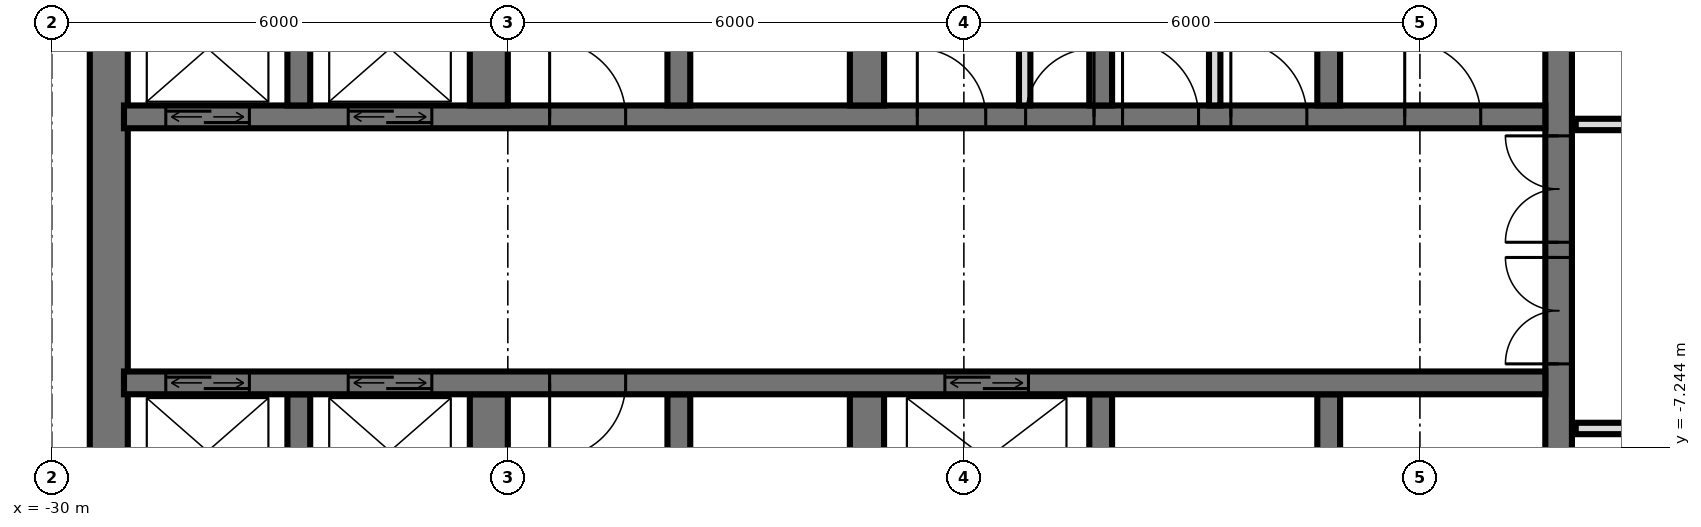
"""IFC4 building model, lengths in metres.
Left out: names, types, materials, properties, quantities, classifications, styles, units other than length and angle.
Written with IfcOpenShell. Run it as: python <this file> out.ifc"""

import sys

from ifc_helpers import new_model, si_unit, direction, frame, frame_2d, origin, place, context, subcontext, project, spatial, rectangle, extrude, element, fill, save


model = new_model("IFC4")
c1 = context("Model", 3, precision=1e-05, world=origin(), true_north=direction((0.0, 1.0)))
c2 = subcontext(c1, "Body", "Model", "MODEL_VIEW")
j1 = project(units=[si_unit("LENGTHUNIT", "METRE"), si_unit("PLANEANGLEUNIT", "RADIAN")], contexts=[c1])
p1 = place(None, origin())
s1 = spatial("IfcSite", under=j1, at=p1, CompositionType="ELEMENT")
p2 = place(p1, origin())
s2 = spatial("IfcBuilding", under=s1, at=p2, CompositionType="ELEMENT")
p3 = place(p2, frame((0.0, 0.0, 78.0)))
s3 = spatial("IfcBuildingStorey", under=s2, at=p3, CompositionType="ELEMENT", Elevation=78.0)
p4 = place(p3, frame((-10.175, -14.55, 0.0), z_axis=(0.0, 0.0, 1.0), x_axis=(0.0, 1.0, 0.0)))
e1 = element("IfcWall", 1, at=p4, inside=s3, PredefinedType="SHEAR", context=c2, shape_type="SweptSolid", body=[
    extrude(rectangle(XDim=14.1, YDim=0.35, at=frame_2d((7.05, 0.0))), origin(), (0.0, 0.0, 1.0), 3.6),
])
p5 = place(p4, frame((8.4, 0.0, 0.0)))
e2 = element("IfcOpeningElement", 2, at=p5, cuts=e1, PredefinedType="OPENING", context=c2, shape_type="SweptSolid", body=[
    extrude(rectangle(XDim=1.4, YDim=2.4, at=frame_2d((0.7, 1.2))), frame((0.0, 0.185, 0.0), z_axis=(0.0, -1.0, 0.0), x_axis=(1.0, 0.0, 0.0)), (0.0, 0.0, 1.0), 0.37),
])
p6 = place(p4, frame((10.0, 0.0, 0.0)))
e3 = element("IfcOpeningElement", 3, at=p6, cuts=e1, PredefinedType="OPENING", context=c2, shape_type="SweptSolid", body=[
    extrude(rectangle(XDim=1.4, YDim=2.4, at=frame_2d((0.7, 1.2))), frame((0.0, 0.185, 0.0), z_axis=(0.0, -1.0, 0.0), x_axis=(1.0, 0.0, 0.0)), (0.0, 0.0, 1.0), 0.37),
])
p7 = place(p4, frame((4.0, 0.0, 0.0)))
e4 = element("IfcOpeningElement", 4, at=p7, cuts=e1, PredefinedType="OPENING", context=c2, shape_type="SweptSolid", body=[
    extrude(rectangle(XDim=1.2, YDim=2.1, at=frame_2d((0.6, 1.05))), frame((0.0, 0.185, 0.0), z_axis=(0.0, -1.0, 0.0), x_axis=(1.0, 0.0, 0.0)), (0.0, 0.0, 1.0), 0.37),
])
p8 = place(p3, frame((-29.25, -14.55, 0.0), z_axis=(0.0, 0.0, 1.0), x_axis=(0.0, 1.0, 0.0)))
e5 = element("IfcWall", 5, at=p8, inside=s3, PredefinedType="SHEAR", context=c2, shape_type="SweptSolid", body=[
    extrude(rectangle(XDim=14.1, YDim=0.5, at=frame_2d((7.05, 0.0))), origin(), (0.0, 0.0, 1.0), 3.6),
])
p9 = place(p3, frame((-29.05, -2.9, 0.0), z_axis=(0.0, 0.0, 1.0), x_axis=(1.0, 0.0, 0.0)))
e6 = element("IfcWall", 6, at=p9, inside=s3, PredefinedType="SHEAR", context=c2, shape_type="SweptSolid", body=[
    extrude(rectangle(XDim=18.7, YDim=0.3, at=frame_2d((9.35, 0.0))), origin(), (0.0, 0.0, 1.0), 3.6),
])
p10 = place(p9, frame((2.95, 0.0, 0.0)))
e7 = element("IfcOpeningElement", 7, at=p10, cuts=e6, PredefinedType="OPENING", context=c2, shape_type="SweptSolid", body=[
    extrude(rectangle(XDim=1.1, YDim=2.1, at=frame_2d((0.55, 1.05))), frame((0.0, 0.16, 0.0), z_axis=(0.0, -1.0, 0.0), x_axis=(1.0, 0.0, 0.0)), (0.0, 0.0, 1.0), 0.32),
])
p11 = place(p9, frame((0.55, 0.0, 0.0)))
e8 = element("IfcOpeningElement", 8, at=p11, cuts=e6, PredefinedType="OPENING", context=c2, shape_type="SweptSolid", body=[
    extrude(rectangle(XDim=1.1, YDim=2.1, at=frame_2d((0.55, 1.05))), frame((0.0, 0.16, 0.0), z_axis=(0.0, -1.0, 0.0), x_axis=(1.0, 0.0, 0.0)), (0.0, 0.0, 1.0), 0.32),
])
p12 = place(p9, frame((11.863, 0.0, 0.0)))
e9 = element("IfcOpeningElement", 9, at=p12, cuts=e6, PredefinedType="OPENING", context=c2, shape_type="SweptSolid", body=[
    extrude(rectangle(XDim=0.9, YDim=2.1, at=frame_2d((0.45, 1.05))), frame((0.0, 0.16, 0.0), z_axis=(0.0, -1.0, 0.0), x_axis=(1.0, 0.0, 0.0)), (0.0, 0.0, 1.0), 0.32),
])
p13 = place(p9, frame((10.438, 0.0, 0.0)))
e10 = element("IfcOpeningElement", 10, at=p13, cuts=e6, PredefinedType="OPENING", context=c2, shape_type="SweptSolid", body=[
    extrude(rectangle(XDim=0.9, YDim=2.1, at=frame_2d((0.45, 1.05))), frame((0.0, 0.16, 0.0), z_axis=(0.0, -1.0, 0.0), x_axis=(1.0, 0.0, 0.0)), (0.0, 0.0, 1.0), 0.32),
])
p14 = place(p9, frame((16.85, 0.0, 0.0)))
e11 = element("IfcOpeningElement", 11, at=p14, cuts=e6, PredefinedType="OPENING", context=c2, shape_type="SweptSolid", body=[
    extrude(rectangle(XDim=1.0, YDim=2.1, at=frame_2d((0.5, 1.05))), frame((0.0, 0.16, 0.0), z_axis=(0.0, -1.0, 0.0), x_axis=(1.0, 0.0, 0.0)), (0.0, 0.0, 1.0), 0.32),
])
p15 = place(p9, frame((14.562, 0.0, 0.0)))
e12 = element("IfcOpeningElement", 12, at=p15, cuts=e6, PredefinedType="OPENING", context=c2, shape_type="SweptSolid", body=[
    extrude(rectangle(XDim=1.0, YDim=2.1, at=frame_2d((0.5, 1.05))), frame((0.0, 0.16, 0.0), z_axis=(0.0, -1.0, 0.0), x_axis=(1.0, 0.0, 0.0)), (0.0, 0.0, 1.0), 0.32),
])
p16 = place(p9, frame((13.137, 0.0, 0.0)))
e13 = element("IfcOpeningElement", 13, at=p16, cuts=e6, PredefinedType="OPENING", context=c2, shape_type="SweptSolid", body=[
    extrude(rectangle(XDim=1.0, YDim=2.1, at=frame_2d((0.5, 1.05))), frame((0.0, 0.16, 0.0), z_axis=(0.0, -1.0, 0.0), x_axis=(1.0, 0.0, 0.0)), (0.0, 0.0, 1.0), 0.32),
])
p17 = place(p9, frame((5.6, 0.0, 0.0)))
e14 = element("IfcOpeningElement", 14, at=p17, cuts=e6, PredefinedType="OPENING", context=c2, shape_type="SweptSolid", body=[
    extrude(rectangle(XDim=1.0, YDim=2.1, at=frame_2d((0.5, 1.05))), frame((0.0, 0.16, 0.0), z_axis=(0.0, -1.0, 0.0), x_axis=(1.0, 0.0, 0.0)), (0.0, 0.0, 1.0), 0.32),
])
p18 = place(p3, frame((-29.05, -6.4, 0.0), z_axis=(0.0, 0.0, 1.0), x_axis=(1.0, 0.0, 0.0)))
e15 = element("IfcWall", 15, at=p18, inside=s3, PredefinedType="SHEAR", context=c2, shape_type="SweptSolid", body=[
    extrude(rectangle(XDim=18.7, YDim=0.3, at=frame_2d((9.35, 0.0))), origin(), (0.0, 0.0, 1.0), 3.6),
])
p19 = place(p18, frame((2.95, 0.0, 0.0)))
e16 = element("IfcOpeningElement", 16, at=p19, cuts=e15, PredefinedType="OPENING", context=c2, shape_type="SweptSolid", body=[
    extrude(rectangle(XDim=1.1, YDim=2.1, at=frame_2d((0.55, 1.05))), frame((0.0, 0.16, 0.0), z_axis=(0.0, -1.0, 0.0), x_axis=(1.0, 0.0, 0.0)), (0.0, 0.0, 1.0), 0.32),
])
p20 = place(p18, frame((0.55, 0.0, 0.0)))
e17 = element("IfcOpeningElement", 17, at=p20, cuts=e15, PredefinedType="OPENING", context=c2, shape_type="SweptSolid", body=[
    extrude(rectangle(XDim=1.1, YDim=2.1, at=frame_2d((0.55, 1.05))), frame((0.0, 0.16, 0.0), z_axis=(0.0, -1.0, 0.0), x_axis=(1.0, 0.0, 0.0)), (0.0, 0.0, 1.0), 0.32),
])
p21 = place(p18, frame((10.8, 0.0, 0.0)))
e18 = element("IfcOpeningElement", 18, at=p21, cuts=e15, PredefinedType="OPENING", context=c2, shape_type="SweptSolid", body=[
    extrude(rectangle(XDim=1.1, YDim=2.1, at=frame_2d((0.55, 1.05))), frame((0.0, 0.16, 0.0), z_axis=(0.0, -1.0, 0.0), x_axis=(1.0, 0.0, 0.0)), (0.0, 0.0, 1.0), 0.32),
])
p22 = place(p18, frame((5.6, 0.0, 0.0)))
e19 = element("IfcOpeningElement", 19, at=p22, cuts=e15, PredefinedType="OPENING", context=c2, shape_type="SweptSolid", body=[
    extrude(rectangle(XDim=1.0, YDim=2.1, at=frame_2d((0.5, 1.05))), frame((0.0, 0.16, 0.0), z_axis=(0.0, -1.0, 0.0), x_axis=(1.0, 0.0, 0.0)), (0.0, 0.0, 1.0), 0.32),
])
for number, where, z_axis, x_axis in (
    (20, (-13.2, -2.75, 0.0), (0.0, 0.0, 1.0), (0.0, 1.0, 0.0)),
    (21, (-13.2, -8.85, 0.0), (0.0, 0.0, 1.0), (0.0, 1.0, 0.0)),
    (22, (-16.2, -2.75, 0.0), (0.0, 0.0, 1.0), (0.0, 1.0, 0.0)),
    (23, (-16.2, -8.85, 0.0), (0.0, 0.0, 1.0), (0.0, 1.0, 0.0)),
):
    element("IfcWall", number, at=place(p3, frame(where, z_axis=z_axis, x_axis=x_axis)), inside=s3, PredefinedType="SHEAR", context=c2, shape_type="SweptSolid", body=[
        extrude(rectangle(XDim=2.3, YDim=0.3, at=frame_2d((1.15, 0.0))), origin(), (0.0, 0.0, 1.0), 3.6),
    ])
for number, where, z_axis, x_axis in (
    (24, (-19.275, -2.75, 0.0), (0.0, 0.0, 1.0), (0.0, 1.0, 0.0)),
    (25, (-19.275, -8.85, 0.0), (0.0, 0.0, 1.0), (0.0, 1.0, 0.0)),
):
    element("IfcWall", number, at=place(p3, frame(where, z_axis=z_axis, x_axis=x_axis)), inside=s3, PredefinedType="SHEAR", context=c2, shape_type="SweptSolid", body=[
        extrude(rectangle(XDim=2.3, YDim=0.45, at=frame_2d((1.15, 0.0))), origin(), (0.0, 0.0, 1.0), 3.6),
    ])
for number, where, z_axis, x_axis in (
    (26, (-21.75, -2.75, 0.0), (0.0, 0.0, 1.0), (0.0, 1.0, 0.0)),
    (27, (-21.75, -8.85, 0.0), (0.0, 0.0, 1.0), (0.0, 1.0, 0.0)),
):
    element("IfcWall", number, at=place(p3, frame(where, z_axis=z_axis, x_axis=x_axis)), inside=s3, PredefinedType="SHEAR", context=c2, shape_type="SweptSolid", body=[
        extrude(rectangle(XDim=2.3, YDim=0.3, at=frame_2d((1.15, 0.0))), origin(), (0.0, 0.0, 1.0), 3.6),
    ])
for number, where, z_axis, x_axis in (
    (28, (-24.25, -2.75, 0.0), (0.0, 0.0, 1.0), (0.0, 1.0, 0.0)),
    (29, (-24.25, -8.85, 0.0), (0.0, 0.0, 1.0), (0.0, 1.0, 0.0)),
):
    element("IfcWall", number, at=place(p3, frame(where, z_axis=z_axis, x_axis=x_axis)), inside=s3, PredefinedType="SHEAR", context=c2, shape_type="SweptSolid", body=[
        extrude(rectangle(XDim=2.3, YDim=0.5, at=frame_2d((1.15, 0.0))), origin(), (0.0, 0.0, 1.0), 3.6),
    ])
for number, where, z_axis, x_axis in (
    (30, (-26.75, -2.75, 0.0), (0.0, 0.0, 1.0), (0.0, 1.0, 0.0)),
    (31, (-26.75, -8.85, 0.0), (0.0, 0.0, 1.0), (0.0, 1.0, 0.0)),
):
    element("IfcWall", number, at=place(p3, frame(where, z_axis=z_axis, x_axis=x_axis)), inside=s3, PredefinedType="SHEAR", context=c2, shape_type="SweptSolid", body=[
        extrude(rectangle(XDim=2.3, YDim=0.3, at=frame_2d((1.15, 0.0))), origin(), (0.0, 0.0, 1.0), 3.6),
    ])
for number, where, z_axis, x_axis in (
    (32, (-17.2, -2.75, 0.0), (0.0, 0.0, 1.0), (0.0, 1.0, 0.0)),
    (33, (-14.7, -2.75, 0.0), (0.0, 0.0, 1.0), (0.0, 1.0, 0.0)),
):
    element("IfcWall", number, at=place(p3, frame(where, z_axis=z_axis, x_axis=x_axis)), inside=s3, PredefinedType="PARTITIONING", context=c2, shape_type="SweptSolid", body=[
        extrude(rectangle(XDim=2.3, YDim=0.15, at=frame_2d((1.15, 0.0))), origin(), (0.0, 0.0, 1.0), 3.3),
    ])
p23 = place(p3, frame((-9.95, -7.0, 0.0), z_axis=(0.0, 0.0, 1.0), x_axis=(1.0, 0.0, 0.0)))
e34 = element("IfcWall", 34, at=p23, inside=s3, PredefinedType="PARTITIONING", context=c2, shape_type="SweptSolid", body=[
    extrude(rectangle(XDim=19.9, YDim=0.15, at=frame_2d((9.95, 0.0))), origin(), (0.0, 0.0, 1.0), 3.32),
])
p24 = place(p23, frame((9.45, 0.0, 0.0)))
e35 = element("IfcOpeningElement", 35, at=p24, cuts=e34, PredefinedType="OPENING", context=c2, shape_type="SweptSolid", body=[
    extrude(rectangle(XDim=1.0, YDim=2.1, at=frame_2d((0.5, 1.05))), frame((0.0, 0.085, 0.0), z_axis=(0.0, -1.0, 0.0), x_axis=(1.0, 0.0, 0.0)), (0.0, 0.0, 1.0), 0.17),
])
p25 = place(p23, frame((15.45, 0.0, 0.0)))
e36 = element("IfcOpeningElement", 36, at=p25, cuts=e34, PredefinedType="OPENING", context=c2, shape_type="SweptSolid", body=[
    extrude(rectangle(XDim=1.0, YDim=2.1, at=frame_2d((0.5, 1.05))), frame((0.0, 0.085, 0.0), z_axis=(0.0, -1.0, 0.0), x_axis=(1.0, 0.0, 0.0)), (0.0, 0.0, 1.0), 0.17),
])
p26 = place(p3, frame((-9.95, -3.0, 0.0), z_axis=(0.0, 0.0, 1.0), x_axis=(1.0, 0.0, 0.0)))
e37 = element("IfcWall", 37, at=p26, inside=s3, PredefinedType="PARTITIONING", context=c2, shape_type="SweptSolid", body=[
    extrude(rectangle(XDim=19.9, YDim=0.15, at=frame_2d((9.95, 0.0))), origin(), (0.0, 0.0, 1.0), 3.32),
])
p27 = place(p26, frame((2.2, 0.0, 0.0)))
e38 = element("IfcOpeningElement", 38, at=p27, cuts=e37, PredefinedType="OPENING", context=c2, shape_type="SweptSolid", body=[
    extrude(rectangle(XDim=1.0, YDim=2.1, at=frame_2d((0.5, 1.05))), frame((0.0, 0.085, 0.0), z_axis=(0.0, -1.0, 0.0), x_axis=(1.0, 0.0, 0.0)), (0.0, 0.0, 1.0), 0.17),
])
p28 = place(p26, frame((7.2, 0.0, 0.0)))
e39 = element("IfcOpeningElement", 39, at=p28, cuts=e37, PredefinedType="OPENING", context=c2, shape_type="SweptSolid", body=[
    extrude(rectangle(XDim=1.0, YDim=2.1, at=frame_2d((0.5, 1.05))), frame((0.0, 0.085, 0.0), z_axis=(0.0, -1.0, 0.0), x_axis=(1.0, 0.0, 0.0)), (0.0, 0.0, 1.0), 0.17),
])
p29 = place(p26, frame((11.7, 0.0, 0.0)))
e40 = element("IfcOpeningElement", 40, at=p29, cuts=e37, PredefinedType="OPENING", context=c2, shape_type="SweptSolid", body=[
    extrude(rectangle(XDim=1.0, YDim=2.1, at=frame_2d((0.5, 1.05))), frame((0.0, 0.085, 0.0), z_axis=(0.0, -1.0, 0.0), x_axis=(1.0, 0.0, 0.0)), (0.0, 0.0, 1.0), 0.17),
])
p30 = place(p26, frame((15.45, 0.0, 0.0)))
e41 = element("IfcOpeningElement", 41, at=p30, cuts=e37, PredefinedType="OPENING", context=c2, shape_type="SweptSolid", body=[
    extrude(rectangle(XDim=1.0, YDim=2.1, at=frame_2d((0.5, 1.05))), frame((0.0, 0.085, 0.0), z_axis=(0.0, -1.0, 0.0), x_axis=(1.0, 0.0, 0.0)), (0.0, 0.0, 1.0), 0.17),
])
p31 = place(p26, frame((18.2, 0.0, 0.0)))
e42 = element("IfcOpeningElement", 42, at=p31, cuts=e37, PredefinedType="OPENING", context=c2, shape_type="SweptSolid", body=[
    extrude(rectangle(XDim=1.0, YDim=2.1, at=frame_2d((0.5, 1.05))), frame((0.0, 0.085, 0.0), z_axis=(0.0, -1.0, 0.0), x_axis=(1.0, 0.0, 0.0)), (0.0, 0.0, 1.0), 0.17),
])
p32 = place(p10, origin())
e43 = element("IfcDoor", 43, at=p32, inside=s3, OperationType="DOUBLE_DOOR_SLIDING", PredefinedType="USERDEFINED", context=c2, shape_type="SweptSolid", body=[
    extrude(rectangle(XDim=1.1, YDim=2.1, at=frame_2d((0.55, 1.05))), frame((0.0, 0.025, 0.0), z_axis=(0.0, -1.0, 0.0), x_axis=(1.0, 0.0, 0.0)), (0.0, 0.0, 1.0), 0.05),
])
fill(e7, e43)
p33 = place(p11, origin())
e44 = element("IfcDoor", 44, at=p33, inside=s3, OperationType="DOUBLE_DOOR_SLIDING", PredefinedType="USERDEFINED", context=c2, shape_type="SweptSolid", body=[
    extrude(rectangle(XDim=1.1, YDim=2.1, at=frame_2d((0.55, 1.05))), frame((0.0, 0.025, 0.0), z_axis=(0.0, -1.0, 0.0), x_axis=(1.0, 0.0, 0.0)), (0.0, 0.0, 1.0), 0.05),
])
fill(e8, e44)
p34 = place(p19, origin())
e45 = element("IfcDoor", 45, at=p34, inside=s3, OperationType="DOUBLE_DOOR_SLIDING", PredefinedType="USERDEFINED", context=c2, shape_type="SweptSolid", body=[
    extrude(rectangle(XDim=1.1, YDim=2.1, at=frame_2d((0.55, 1.05))), frame((0.0, 0.025, 0.0), z_axis=(0.0, -1.0, 0.0), x_axis=(1.0, 0.0, 0.0)), (0.0, 0.0, 1.0), 0.05),
])
fill(e16, e45)
p35 = place(p20, origin())
e46 = element("IfcDoor", 46, at=p35, inside=s3, OperationType="DOUBLE_DOOR_SLIDING", PredefinedType="USERDEFINED", context=c2, shape_type="SweptSolid", body=[
    extrude(rectangle(XDim=1.1, YDim=2.1, at=frame_2d((0.55, 1.05))), frame((0.0, 0.025, 0.0), z_axis=(0.0, -1.0, 0.0), x_axis=(1.0, 0.0, 0.0)), (0.0, 0.0, 1.0), 0.05),
])
fill(e17, e46)
p36 = place(p21, origin())
e47 = element("IfcDoor", 47, at=p36, inside=s3, OperationType="DOUBLE_DOOR_SLIDING", PredefinedType="USERDEFINED", context=c2, shape_type="SweptSolid", body=[
    extrude(rectangle(XDim=1.1, YDim=2.1, at=frame_2d((0.55, 1.05))), frame((0.0, 0.025, 0.0), z_axis=(0.0, -1.0, 0.0), x_axis=(1.0, 0.0, 0.0)), (0.0, 0.0, 1.0), 0.05),
])
fill(e18, e47)
p37 = place(p5, origin())
e48 = element("IfcDoor", 48, at=p37, inside=s3, OperationType="DOUBLE_DOOR_SINGLE_SWING", PredefinedType="DOOR", context=c2, shape_type="SweptSolid", body=[
    extrude(rectangle(XDim=1.4, YDim=2.4, at=frame_2d((0.7, 1.2))), frame((0.0, 0.025, 0.0), z_axis=(0.0, -1.0, 0.0), x_axis=(1.0, 0.0, 0.0)), (0.0, 0.0, 1.0), 0.05),
])
fill(e2, e48)
p38 = place(p6, origin())
e49 = element("IfcDoor", 49, at=p38, inside=s3, OperationType="DOUBLE_DOOR_SINGLE_SWING", PredefinedType="DOOR", context=c2, shape_type="SweptSolid", body=[
    extrude(rectangle(XDim=1.4, YDim=2.4, at=frame_2d((0.7, 1.2))), frame((0.0, 0.025, 0.0), z_axis=(0.0, -1.0, 0.0), x_axis=(1.0, 0.0, 0.0)), (0.0, 0.0, 1.0), 0.05),
])
fill(e3, e49)
p39 = place(p12, origin())
e50 = element("IfcDoor", 50, at=p39, inside=s3, OperationType="SINGLE_SWING_LEFT", PredefinedType="DOOR", context=c2, shape_type="SweptSolid", body=[
    extrude(rectangle(XDim=0.9, YDim=2.1, at=frame_2d((0.45, 1.05))), frame((0.0, 0.025, 0.0), z_axis=(0.0, -1.0, 0.0), x_axis=(1.0, 0.0, 0.0)), (0.0, 0.0, 1.0), 0.05),
])
fill(e9, e50)
p40 = place(p13, origin())
e51 = element("IfcDoor", 51, at=p40, inside=s3, OperationType="SINGLE_SWING_RIGHT", PredefinedType="DOOR", context=c2, shape_type="SweptSolid", body=[
    extrude(rectangle(XDim=0.9, YDim=2.1, at=frame_2d((0.45, 1.05))), frame((0.0, 0.025, 0.0), z_axis=(0.0, -1.0, 0.0), x_axis=(1.0, 0.0, 0.0)), (0.0, 0.0, 1.0), 0.05),
])
fill(e10, e51)
p41 = place(p14, origin())
e52 = element("IfcDoor", 52, at=p41, inside=s3, OperationType="SINGLE_SWING_RIGHT", PredefinedType="DOOR", context=c2, shape_type="SweptSolid", body=[
    extrude(rectangle(XDim=1.0, YDim=2.1, at=frame_2d((0.5, 1.05))), frame((0.0, 0.025, 0.0), z_axis=(0.0, -1.0, 0.0), x_axis=(1.0, 0.0, 0.0)), (0.0, 0.0, 1.0), 0.05),
])
fill(e11, e52)
p42 = place(p15, origin())
e53 = element("IfcDoor", 53, at=p42, inside=s3, OperationType="SINGLE_SWING_RIGHT", PredefinedType="DOOR", context=c2, shape_type="SweptSolid", body=[
    extrude(rectangle(XDim=1.0, YDim=2.1, at=frame_2d((0.5, 1.05))), frame((0.0, 0.025, 0.0), z_axis=(0.0, -1.0, 0.0), x_axis=(1.0, 0.0, 0.0)), (0.0, 0.0, 1.0), 0.05),
])
fill(e12, e53)
p43 = place(p16, origin())
e54 = element("IfcDoor", 54, at=p43, inside=s3, OperationType="SINGLE_SWING_RIGHT", PredefinedType="DOOR", context=c2, shape_type="SweptSolid", body=[
    extrude(rectangle(XDim=1.0, YDim=2.1, at=frame_2d((0.5, 1.05))), frame((0.0, 0.025, 0.0), z_axis=(0.0, -1.0, 0.0), x_axis=(1.0, 0.0, 0.0)), (0.0, 0.0, 1.0), 0.05),
])
fill(e13, e54)
p44 = place(p17, origin())
e55 = element("IfcDoor", 55, at=p44, inside=s3, OperationType="SINGLE_SWING_RIGHT", PredefinedType="DOOR", context=c2, shape_type="SweptSolid", body=[
    extrude(rectangle(XDim=1.0, YDim=2.1, at=frame_2d((0.5, 1.05))), frame((0.0, 0.025, 0.0), z_axis=(0.0, -1.0, 0.0), x_axis=(1.0, 0.0, 0.0)), (0.0, 0.0, 1.0), 0.05),
])
fill(e14, e55)
p45 = place(p22, frame((0.5, 0.0, 0.0), z_axis=(0.0, 0.0, 1.0), x_axis=(-1.0, 0.0, 0.0)))
e56 = element("IfcDoor", 56, at=p45, inside=s3, OperationType="SINGLE_SWING_LEFT", PredefinedType="DOOR", context=c2, shape_type="SweptSolid", body=[
    extrude(rectangle(XDim=1.0, YDim=2.1, at=frame_2d((0.0, 1.05))), frame((0.0, -0.025, 0.0), z_axis=(0.0, 1.0, 0.0), x_axis=(-1.0, 0.0, 0.0)), (0.0, 0.0, 1.0), 0.05),
])
fill(e19, e56)
save(model, sys.argv[1])
